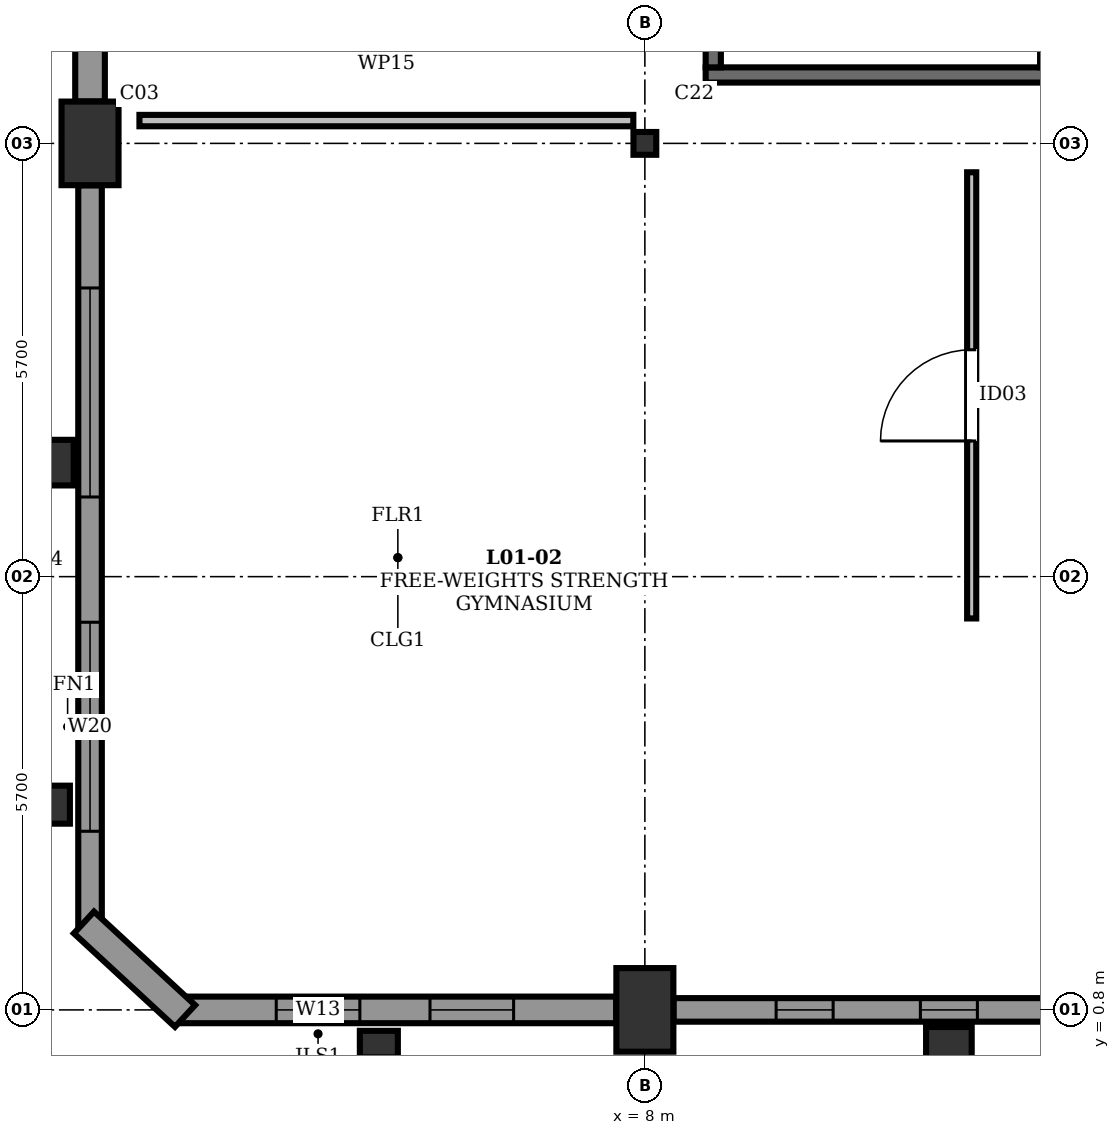
"""IFC4 building model, lengths in metres.
Left out: names, types, materials, properties, quantities, classifications, styles, units other than length and angle.
Written with IfcOpenShell. Run it as: python <this file> out.ifc"""

import sys

from ifc_helpers import new_model, si_unit, direction, frame, frame_2d, origin, origin_2d, place, context, subcontext, project, spatial, rectangle, hollow_rectangle, extrude, element, fill, save


model = new_model("IFC4")
c1 = context("Model", 3, precision=1e-05, world=origin(), true_north=direction((0.0, 1.0)))
c2 = subcontext(c1, "Body", "Model", "MODEL_VIEW")
j1 = project(units=[si_unit("LENGTHUNIT", "METRE"), si_unit("PLANEANGLEUNIT", "RADIAN")], contexts=[c1])
p1 = place(None, origin())
s1 = spatial("IfcSite", under=j1, at=p1, CompositionType="ELEMENT")
p2 = place(p1, origin())
s2 = spatial("IfcBuilding", under=s1, at=p2, CompositionType="ELEMENT")
p3 = place(p2, frame((0.0, 0.0, 5.4)))
s3 = spatial("IfcBuildingStorey", under=s2, at=p3, CompositionType="ELEMENT", Elevation=5.4)
for number, where, z_axis, x_axis in (
    (1, (0.7, 12.2, 0.0), (0.0, 0.0, 1.0), (1.0, 0.0, 0.0)),
    (2, (8.0, 0.8, 0.0), (0.0, 0.0, 1.0), (1.0, 0.0, 0.0)),
):
    element("IfcColumn", number, at=place(p3, frame(where, z_axis=z_axis, x_axis=x_axis)), inside=s3, PredefinedType="COLUMN", context=c2, shape_type="SweptSolid", body=[
        extrude(rectangle(XDim=0.75, YDim=1.1, at=origin_2d()), origin(), (0.0, 0.0, 1.0), 4.8),
    ])
p4 = place(p3, frame((8.0, 12.2, 0.0), z_axis=(0.0, 0.0, 1.0), x_axis=(1.0, 0.0, 0.0)))
e3 = element("IfcColumn", 3, at=p4, inside=s3, PredefinedType="COLUMN", context=c2, shape_type="SweptSolid", body=[
    extrude(hollow_rectangle(XDim=0.3, YDim=0.3, WallThickness=0.012, at=origin_2d()), origin(), (0.0, 0.0, 1.0), 4.8),
])
p5 = place(p3, frame((0.26, 3.5, 0.0), z_axis=(0.0, 0.0, 1.0), x_axis=(1.0, 0.0, 0.0)))
e4 = element("IfcColumn", 4, at=p5, inside=s3, PredefinedType="PILASTER", context=c2, shape_type="SweptSolid", body=[
    extrude(rectangle(XDim=0.35, YDim=0.5, at=origin_2d()), origin(), (0.0, 0.0, 1.0), 4.8),
])
p6 = place(p3, frame((0.26, 8.0, 0.0), z_axis=(0.0, 0.0, 1.0), x_axis=(1.0, 0.0, 0.0)))
e5 = element("IfcColumn", 5, at=p6, inside=s3, PredefinedType="PILASTER", context=c2, shape_type="SweptSolid", body=[
    extrude(rectangle(XDim=0.45, YDim=0.6, at=origin_2d()), origin(), (0.0, 0.0, 1.0), 4.8),
])
p7 = place(p3, frame((4.5, 0.35, 0.0), z_axis=(0.0, 0.0, 1.0), x_axis=(0.0, 1.0, 0.0)))
e6 = element("IfcColumn", 6, at=p7, inside=s3, PredefinedType="PILASTER", context=c2, shape_type="SweptSolid", body=[
    extrude(rectangle(XDim=0.35, YDim=0.5, at=origin_2d()), origin(), (0.0, 0.0, 1.0), 4.8),
])
p8 = place(p3, frame((12.0, 0.35, 0.0), z_axis=(0.0, 0.0, 1.0), x_axis=(0.0, 1.0, 0.0)))
e7 = element("IfcColumn", 7, at=p8, inside=s3, PredefinedType="PILASTER", context=c2, shape_type="SweptSolid", body=[
    extrude(rectangle(XDim=0.45, YDim=0.6, at=origin_2d()), origin(), (0.0, 0.0, 1.0), 4.8),
])
p9 = place(p3, frame((0.7, 1.8, 0.0), z_axis=(0.0, 0.0, 1.0), x_axis=(0.0, 1.0, 0.0)))
e8 = element("IfcWall", 8, at=p9, inside=s3, PredefinedType="STANDARD", context=c2, shape_type="SweptSolid", body=[
    extrude(rectangle(XDim=9.848, YDim=0.31, at=frame_2d((4.924, 0.0))), origin(), (0.0, 0.0, 1.0), 4.5),
])
p10 = place(p9, frame((1.35, 0.0, 0.75)))
e9 = element("IfcOpeningElement", 9, at=p10, cuts=e8, PredefinedType="OPENING", context=c2, shape_type="SweptSolid", body=[
    extrude(rectangle(XDim=2.75, YDim=2.35, at=frame_2d((1.375, 1.175))), frame((0.0, 0.167, 0.0), z_axis=(0.0, -1.0, 0.0), x_axis=(1.0, 0.0, 0.0)), (0.0, 0.0, 1.0), 0.334),
])
p11 = place(p9, frame((5.748, 0.0, 0.75)))
e10 = element("IfcOpeningElement", 10, at=p11, cuts=e8, PredefinedType="OPENING", context=c2, shape_type="SweptSolid", body=[
    extrude(rectangle(XDim=2.75, YDim=2.35, at=frame_2d((1.375, 1.175))), frame((0.0, 0.167, 0.0), z_axis=(0.0, -1.0, 0.0), x_axis=(1.0, 0.0, 0.0)), (0.0, 0.0, 1.0), 0.334),
])
p12 = place(p3, frame((0.7, 12.752, 0.0), z_axis=(0.0, 0.0, 1.0), x_axis=(0.0, 1.0, 0.0)))
e11 = element("IfcWall", 11, at=p12, inside=s3, PredefinedType="STANDARD", context=c2, shape_type="SweptSolid", body=[
    extrude(rectangle(XDim=10.296, YDim=0.39, at=frame_2d((5.148, 0.0))), origin(), (0.0, 0.0, 1.0), 4.012),
])
p13 = place(p12, frame((1.35, 0.0, 0.75)))
e12 = element("IfcOpeningElement", 12, at=p13, cuts=e11, PredefinedType="OPENING", context=c2, shape_type="SweptSolid", body=[
    extrude(rectangle(XDim=1.95, YDim=1.55, at=frame_2d((0.975, 0.775))), frame((0.0, 0.207, 0.0), z_axis=(0.0, -1.0, 0.0), x_axis=(1.0, 0.0, 0.0)), (0.0, 0.0, 1.0), 0.414),
])
p14 = place(p12, frame((4.173, 0.0, 0.75)))
e13 = element("IfcOpeningElement", 13, at=p14, cuts=e11, PredefinedType="OPENING", context=c2, shape_type="SweptSolid", body=[
    extrude(rectangle(XDim=1.95, YDim=1.55, at=frame_2d((0.975, 0.775))), frame((0.0, 0.207, 0.0), z_axis=(0.0, -1.0, 0.0), x_axis=(1.0, 0.0, 0.0)), (0.0, 0.0, 1.0), 0.414),
])
p15 = place(p12, frame((6.996, 0.0, 0.75)))
e14 = element("IfcOpeningElement", 14, at=p15, cuts=e11, PredefinedType="OPENING", context=c2, shape_type="SweptSolid", body=[
    extrude(rectangle(XDim=1.95, YDim=1.55, at=frame_2d((0.975, 0.775))), frame((0.0, 0.207, 0.0), z_axis=(0.0, -1.0, 0.0), x_axis=(1.0, 0.0, 0.0)), (0.0, 0.0, 1.0), 0.414),
])
p16 = place(p3, frame((1.8, 0.8, 0.0), z_axis=(0.0, 0.0, 1.0), x_axis=(1.0, 0.0, 0.0)))
e15 = element("IfcWall", 15, at=p16, inside=s3, PredefinedType="STANDARD", context=c2, shape_type="SweptSolid", body=[
    extrude(rectangle(XDim=5.823, YDim=0.35, at=frame_2d((2.912, 0.0))), origin(), (0.0, 0.0, 1.0), 4.5),
])
p17 = place(p16, frame((1.35, 0.0, 0.75)))
e16 = element("IfcOpeningElement", 16, at=p17, cuts=e15, PredefinedType="OPENING", context=c2, shape_type="SweptSolid", body=[
    extrude(rectangle(XDim=1.1, YDim=1.25, at=frame_2d((0.55, 0.625))), frame((0.0, 0.187, 0.0), z_axis=(0.0, -1.0, 0.0), x_axis=(1.0, 0.0, 0.0)), (0.0, 0.0, 1.0), 0.374),
])
p18 = place(p16, frame((3.373, 0.0, 0.75)))
e17 = element("IfcOpeningElement", 17, at=p18, cuts=e15, PredefinedType="OPENING", context=c2, shape_type="SweptSolid", body=[
    extrude(rectangle(XDim=1.1, YDim=1.25, at=frame_2d((0.55, 0.625))), frame((0.0, 0.187, 0.0), z_axis=(0.0, -1.0, 0.0), x_axis=(1.0, 0.0, 0.0)), (0.0, 0.0, 1.0), 0.374),
])
p19 = place(p3, frame((8.377, 0.8, 0.0), z_axis=(0.0, 0.0, 1.0), x_axis=(1.0, 0.0, 0.0)))
e18 = element("IfcWall", 18, at=p19, inside=s3, PredefinedType="STANDARD", context=c2, shape_type="SweptSolid", body=[
    extrude(rectangle(XDim=7.246, YDim=0.31, at=frame_2d((3.623, 0.0))), origin(), (0.0, 0.0, 1.0), 4.012),
])
p20 = place(p19, frame((1.35, 0.0, 0.75)))
e19 = element("IfcOpeningElement", 19, at=p20, cuts=e18, PredefinedType="OPENING", context=c2, shape_type="SweptSolid", body=[
    extrude(rectangle(XDim=0.75, YDim=2.35, at=frame_2d((0.375, 1.175))), frame((0.0, 0.167, 0.0), z_axis=(0.0, -1.0, 0.0), x_axis=(1.0, 0.0, 0.0)), (0.0, 0.0, 1.0), 0.334),
])
p21 = place(p19, frame((3.248, 0.0, 0.75)))
e20 = element("IfcOpeningElement", 20, at=p21, cuts=e18, PredefinedType="OPENING", context=c2, shape_type="SweptSolid", body=[
    extrude(rectangle(XDim=0.75, YDim=2.35, at=frame_2d((0.375, 1.175))), frame((0.0, 0.167, 0.0), z_axis=(0.0, -1.0, 0.0), x_axis=(1.0, 0.0, 0.0)), (0.0, 0.0, 1.0), 0.334),
])
p22 = place(p19, frame((5.146, 0.0, 0.75)))
e21 = element("IfcOpeningElement", 21, at=p22, cuts=e18, PredefinedType="OPENING", context=c2, shape_type="SweptSolid", body=[
    extrude(rectangle(XDim=0.75, YDim=2.35, at=frame_2d((0.375, 1.175))), frame((0.0, 0.167, 0.0), z_axis=(0.0, -1.0, 0.0), x_axis=(1.0, 0.0, 0.0)), (0.0, 0.0, 1.0), 0.334),
])
p23 = place(p3, frame((0.62, 1.95, 0.0), z_axis=(0.0, 0.0, 1.0), x_axis=(0.734131351327, -0.679007480812, 0.0)))
e22 = element("IfcWall", 22, at=p23, inside=s3, PredefinedType="STANDARD", context=c2, shape_type="SweptSolid", body=[
    extrude(rectangle(XDim=1.812, YDim=0.39, at=frame_2d((0.906, 0.0))), origin(), (0.0, 0.0, 1.0), 4.5),
])
p24 = place(p3, frame((8.8, 13.1, 0.0), z_axis=(0.0, 0.0, 1.0), x_axis=(1.0, 0.0, 0.0)))
e23 = element("IfcWall", 23, at=p24, inside=s3, PredefinedType="SOLIDWALL", context=c2, shape_type="SweptSolid", body=[
    extrude(rectangle(XDim=4.6, YDim=0.2, at=frame_2d((2.3, 0.0))), origin(), (0.0, 0.0, 1.0), 4.56),
])
p25 = place(p3, frame((8.9, 13.2, 0.0), z_axis=(0.0, 0.0, 1.0), x_axis=(0.0, 1.0, 0.0)))
e24 = element("IfcWall", 24, at=p25, inside=s3, PredefinedType="SOLIDWALL", context=c2, shape_type="SweptSolid", body=[
    extrude(rectangle(XDim=8.8, YDim=0.2, at=frame_2d((4.4, 0.0))), origin(), (0.0, 0.0, 1.0), 4.56),
])
p26 = place(p3, frame((12.3, 5.95, 0.0), z_axis=(0.0, 0.0, 1.0), x_axis=(0.0, 1.0, 0.0)))
e25 = element("IfcWall", 25, at=p26, inside=s3, PredefinedType="PARTITIONING", context=c2, shape_type="SweptSolid", body=[
    extrude(rectangle(XDim=5.87, YDim=0.12, at=frame_2d((2.935, 0.0))), origin(), (0.0, 0.0, 1.0), 3.645),
])
p27 = place(p26, frame((2.335, 0.0, 0.0)))
e26 = element("IfcOpeningElement", 26, at=p27, cuts=e25, PredefinedType="OPENING", context=c2, shape_type="SweptSolid", body=[
    extrude(rectangle(XDim=1.2, YDim=2.15, at=frame_2d((0.6, 1.075))), frame((0.0, 0.072, 0.0), z_axis=(0.0, -1.0, 0.0), x_axis=(1.0, 0.0, 0.0)), (0.0, 0.0, 1.0), 0.144),
])
p28 = place(p3, frame((1.35, 12.5, 0.0), z_axis=(0.0, 0.0, 1.0), x_axis=(1.0, 0.0, 0.0)))
e27 = element("IfcWall", 27, at=p28, inside=s3, PredefinedType="PARTITIONING", context=c2, shape_type="SweptSolid", body=[
    extrude(rectangle(XDim=6.498, YDim=0.15, at=frame_2d((3.249, 0.0))), origin(), (0.0, 0.0, 1.0), 3.645),
])
p29 = place(p10, origin())
e28 = element("IfcWindow", 28, at=p29, inside=s3, PartitioningType="TRIPLE_PANEL_VERTICAL", PredefinedType="WINDOW", context=c2, shape_type="SweptSolid", body=[
    extrude(rectangle(XDim=2.75, YDim=2.35, at=frame_2d((1.375, 1.175))), frame((0.0, 0.08, 0.0), z_axis=(0.0, -1.0, 0.0), x_axis=(1.0, 0.0, 0.0)), (0.0, 0.0, 1.0), 0.06),
])
fill(e9, e28)
p30 = place(p11, origin())
e29 = element("IfcWindow", 29, at=p30, inside=s3, PartitioningType="TRIPLE_PANEL_VERTICAL", PredefinedType="WINDOW", context=c2, shape_type="SweptSolid", body=[
    extrude(rectangle(XDim=2.75, YDim=2.35, at=frame_2d((1.375, 1.175))), frame((0.0, 0.08, 0.0), z_axis=(0.0, -1.0, 0.0), x_axis=(1.0, 0.0, 0.0)), (0.0, 0.0, 1.0), 0.06),
])
fill(e10, e29)
p31 = place(p17, origin())
e30 = element("IfcWindow", 30, at=p31, inside=s3, PartitioningType="SINGLE_PANEL", PredefinedType="WINDOW", context=c2, shape_type="SweptSolid", body=[
    extrude(rectangle(XDim=1.1, YDim=1.25, at=frame_2d((0.55, 0.625))), frame((0.0, 0.08, 0.0), z_axis=(0.0, -1.0, 0.0), x_axis=(1.0, 0.0, 0.0)), (0.0, 0.0, 1.0), 0.06),
])
fill(e16, e30)
p32 = place(p18, origin())
e31 = element("IfcWindow", 31, at=p32, inside=s3, PartitioningType="SINGLE_PANEL", PredefinedType="WINDOW", context=c2, shape_type="SweptSolid", body=[
    extrude(rectangle(XDim=1.1, YDim=1.25, at=frame_2d((0.55, 0.625))), frame((0.0, 0.08, 0.0), z_axis=(0.0, -1.0, 0.0), x_axis=(1.0, 0.0, 0.0)), (0.0, 0.0, 1.0), 0.06),
])
fill(e17, e31)
p33 = place(p20, origin())
e32 = element("IfcWindow", 32, at=p33, inside=s3, PartitioningType="SINGLE_PANEL", PredefinedType="WINDOW", context=c2, shape_type="SweptSolid", body=[
    extrude(rectangle(XDim=0.75, YDim=2.35, at=frame_2d((0.375, 1.175))), frame((0.0, 0.08, 0.0), z_axis=(0.0, -1.0, 0.0), x_axis=(1.0, 0.0, 0.0)), (0.0, 0.0, 1.0), 0.06),
])
fill(e19, e32)
p34 = place(p21, origin())
e33 = element("IfcWindow", 33, at=p34, inside=s3, PartitioningType="SINGLE_PANEL", PredefinedType="WINDOW", context=c2, shape_type="SweptSolid", body=[
    extrude(rectangle(XDim=0.75, YDim=2.35, at=frame_2d((0.375, 1.175))), frame((0.0, 0.08, 0.0), z_axis=(0.0, -1.0, 0.0), x_axis=(1.0, 0.0, 0.0)), (0.0, 0.0, 1.0), 0.06),
])
fill(e20, e33)
p35 = place(p27, origin())
e34 = element("IfcDoor", 34, at=p35, inside=s3, OperationType="SINGLE_SWING_LEFT", PredefinedType="DOOR", context=c2, shape_type="SweptSolid", body=[
    extrude(rectangle(XDim=1.2, YDim=2.15, at=frame_2d((0.6, 1.075))), frame((0.0, 0.025, 0.0), z_axis=(0.0, -1.0, 0.0), x_axis=(1.0, 0.0, 0.0)), (0.0, 0.0, 1.0), 0.05),
])
fill(e26, e34)
save(model, sys.argv[1])
